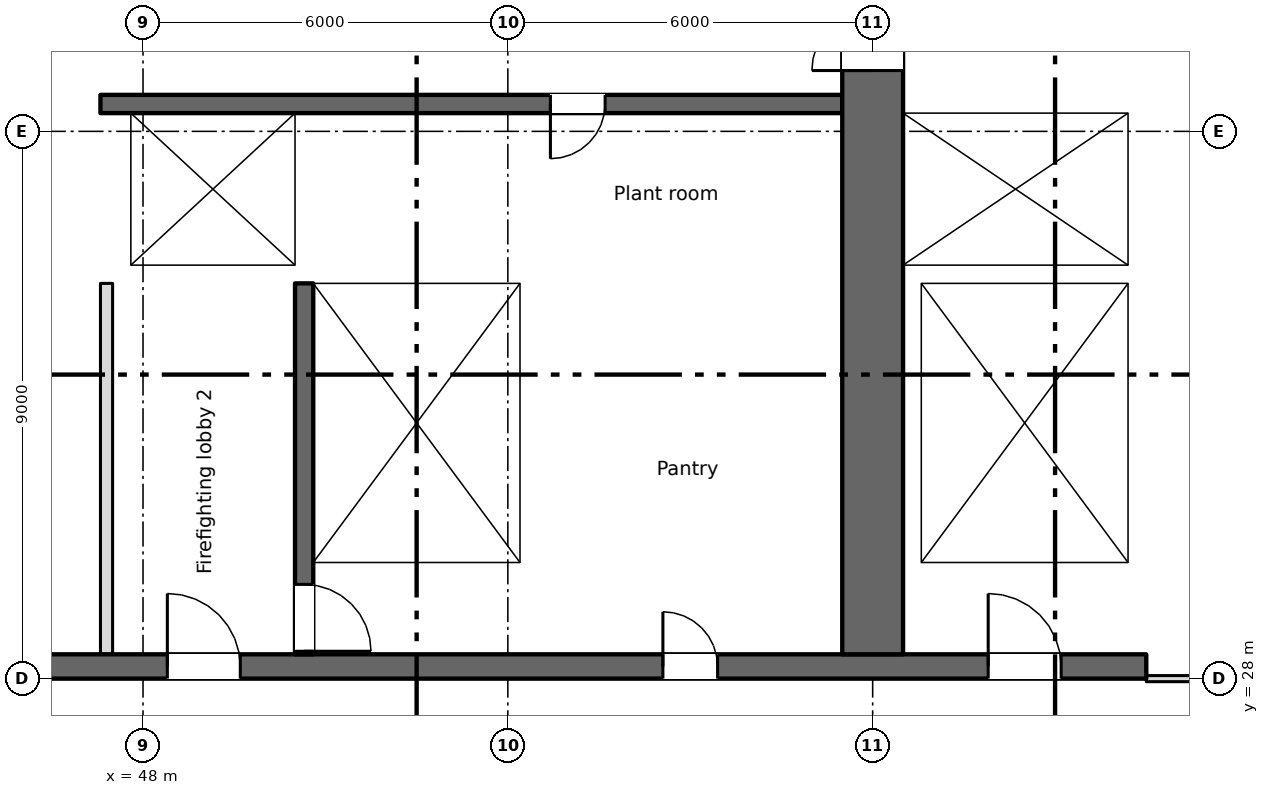
"""IFC4 building model, lengths in metres.
Left out: names, types, materials, properties, quantities, classifications, styles, units other than length and angle.
Written with IfcOpenShell. Run it as: python <this file> out.ifc"""

import sys

from ifc_helpers import new_model, si_unit, direction, frame, frame_2d, origin, place, context, subcontext, project, spatial, rectangle, extrude, element, fill, save


model = new_model("IFC4")
c1 = context("Model", 3, precision=1e-05, world=origin(), true_north=direction((0.0, 1.0)))
c2 = subcontext(c1, "Body", "Model", "MODEL_VIEW")
j1 = project(units=[si_unit("LENGTHUNIT", "METRE"), si_unit("PLANEANGLEUNIT", "RADIAN")], contexts=[c1])
p1 = place(None, origin())
s1 = spatial("IfcSite", under=j1, at=p1, CompositionType="ELEMENT")
p2 = place(p1, origin())
s2 = spatial("IfcBuilding", under=s1, at=p2, CompositionType="ELEMENT")
p3 = place(p2, frame((0.0, 0.0, 67.5)))
s3 = spatial("IfcBuildingStorey", under=s2, at=p3, CompositionType="ELEMENT", Elevation=67.5)
p4 = place(p3, frame((6.7, 28.2, 0.0), z_axis=(0.0, 0.0, 1.0), x_axis=(1.0, 0.0, 0.0)))
e1 = element("IfcWall", 1, at=p4, inside=s3, PredefinedType="SHEAR", context=c2, shape_type="SweptSolid", body=[
    extrude(rectangle(XDim=57.8, YDim=0.4, at=frame_2d((28.9, 0.0))), origin(), (0.0, 0.0, 1.0), 3.35),
])
p5 = place(p4, frame((12.562, 0.0, 0.0)))
e2 = element("IfcOpeningElement", 2, at=p5, cuts=e1, PredefinedType="OPENING", context=c2, shape_type="SweptSolid", body=[
    extrude(rectangle(XDim=0.9, YDim=2.1, at=frame_2d((0.45, 1.05))), frame((0.0, 0.21, 0.0), z_axis=(0.0, -1.0, 0.0), x_axis=(1.0, 0.0, 0.0)), (0.0, 0.0, 1.0), 0.42),
])
p6 = place(p4, frame((15.137, 0.0, 0.0)))
e3 = element("IfcOpeningElement", 3, at=p6, cuts=e1, PredefinedType="OPENING", context=c2, shape_type="SweptSolid", body=[
    extrude(rectangle(XDim=0.9, YDim=2.1, at=frame_2d((0.45, 1.05))), frame((0.0, 0.21, 0.0), z_axis=(0.0, -1.0, 0.0), x_axis=(1.0, 0.0, 0.0)), (0.0, 0.0, 1.0), 0.42),
])
p7 = place(p4, frame((49.85, 0.0, 0.0)))
e4 = element("IfcOpeningElement", 4, at=p7, cuts=e1, PredefinedType="OPENING", context=c2, shape_type="SweptSolid", body=[
    extrude(rectangle(XDim=0.9, YDim=2.1, at=frame_2d((0.45, 1.05))), frame((0.0, 0.21, 0.0), z_axis=(0.0, -1.0, 0.0), x_axis=(1.0, 0.0, 0.0)), (0.0, 0.0, 1.0), 0.42),
])
p8 = place(p4, frame((0.562, 0.0, 0.0)))
e5 = element("IfcOpeningElement", 5, at=p8, cuts=e1, PredefinedType="OPENING", context=c2, shape_type="SweptSolid", body=[
    extrude(rectangle(XDim=0.9, YDim=2.1, at=frame_2d((0.45, 1.05))), frame((0.0, 0.21, 0.0), z_axis=(0.0, -1.0, 0.0), x_axis=(1.0, 0.0, 0.0)), (0.0, 0.0, 1.0), 0.42),
])
p9 = place(p4, frame((2.137, 0.0, 0.0)))
e6 = element("IfcOpeningElement", 6, at=p9, cuts=e1, PredefinedType="OPENING", context=c2, shape_type="SweptSolid", body=[
    extrude(rectangle(XDim=0.9, YDim=2.1, at=frame_2d((0.45, 1.05))), frame((0.0, 0.21, 0.0), z_axis=(0.0, -1.0, 0.0), x_axis=(1.0, 0.0, 0.0)), (0.0, 0.0, 1.0), 0.42),
])
p10 = place(p4, frame((4.7, 0.0, 0.0)))
e7 = element("IfcOpeningElement", 7, at=p10, cuts=e1, PredefinedType="OPENING", context=c2, shape_type="SweptSolid", body=[
    extrude(rectangle(XDim=1.2, YDim=2.1, at=frame_2d((0.6, 1.05))), frame((0.0, 0.21, 0.0), z_axis=(0.0, -1.0, 0.0), x_axis=(1.0, 0.0, 0.0)), (0.0, 0.0, 1.0), 0.42),
])
p11 = place(p4, frame((31.7, 0.0, 0.0)))
e8 = element("IfcOpeningElement", 8, at=p11, cuts=e1, PredefinedType="OPENING", context=c2, shape_type="SweptSolid", body=[
    extrude(rectangle(XDim=1.2, YDim=2.1, at=frame_2d((0.6, 1.05))), frame((0.0, 0.21, 0.0), z_axis=(0.0, -1.0, 0.0), x_axis=(1.0, 0.0, 0.0)), (0.0, 0.0, 1.0), 0.42),
])
p12 = place(p4, frame((55.2, 0.0, 0.0)))
e9 = element("IfcOpeningElement", 9, at=p12, cuts=e1, PredefinedType="OPENING", context=c2, shape_type="SweptSolid", body=[
    extrude(rectangle(XDim=1.2, YDim=2.1, at=frame_2d((0.6, 1.05))), frame((0.0, 0.21, 0.0), z_axis=(0.0, -1.0, 0.0), x_axis=(1.0, 0.0, 0.0)), (0.0, 0.0, 1.0), 0.42),
])
p13 = place(p4, frame((21.7, 0.0, 0.0)))
e10 = element("IfcOpeningElement", 10, at=p13, cuts=e1, PredefinedType="OPENING", context=c2, shape_type="SweptSolid", body=[
    extrude(rectangle(XDim=1.2, YDim=2.1, at=frame_2d((0.6, 1.05))), frame((0.0, 0.21, 0.0), z_axis=(0.0, -1.0, 0.0), x_axis=(1.0, 0.0, 0.0)), (0.0, 0.0, 1.0), 0.42),
])
p14 = place(p4, frame((41.7, 0.0, 0.0)))
e11 = element("IfcOpeningElement", 11, at=p14, cuts=e1, PredefinedType="OPENING", context=c2, shape_type="SweptSolid", body=[
    extrude(rectangle(XDim=1.2, YDim=2.1, at=frame_2d((0.6, 1.05))), frame((0.0, 0.21, 0.0), z_axis=(0.0, -1.0, 0.0), x_axis=(1.0, 0.0, 0.0)), (0.0, 0.0, 1.0), 0.42),
])
p15 = place(p4, frame((24.85, 0.0, 0.0)))
e12 = element("IfcOpeningElement", 12, at=p15, cuts=e1, PredefinedType="OPENING", context=c2, shape_type="SweptSolid", body=[
    extrude(rectangle(XDim=2.4, YDim=2.1, at=frame_2d((1.2, 1.05))), frame((0.0, 0.21, 0.0), z_axis=(0.0, -1.0, 0.0), x_axis=(1.0, 0.0, 0.0)), (0.0, 0.0, 1.0), 0.42),
])
p16 = place(p4, frame((37.35, 0.0, 0.0)))
e13 = element("IfcOpeningElement", 13, at=p16, cuts=e1, PredefinedType="OPENING", context=c2, shape_type="SweptSolid", body=[
    extrude(rectangle(XDim=2.4, YDim=2.1, at=frame_2d((1.2, 1.05))), frame((0.0, 0.21, 0.0), z_axis=(0.0, -1.0, 0.0), x_axis=(1.0, 0.0, 0.0)), (0.0, 0.0, 1.0), 0.42),
])
p17 = place(p4, frame((7.85, 0.0, 0.0)))
e14 = element("IfcOpeningElement", 14, at=p17, cuts=e1, PredefinedType="OPENING", context=c2, shape_type="SweptSolid", body=[
    extrude(rectangle(XDim=2.4, YDim=2.1, at=frame_2d((1.2, 1.05))), frame((0.0, 0.21, 0.0), z_axis=(0.0, -1.0, 0.0), x_axis=(1.0, 0.0, 0.0)), (0.0, 0.0, 1.0), 0.42),
])
p18 = place(p4, frame((28.85, 0.0, 0.0)))
e15 = element("IfcOpeningElement", 15, at=p18, cuts=e1, PredefinedType="OPENING", context=c2, shape_type="SweptSolid", body=[
    extrude(rectangle(XDim=0.9, YDim=2.1, at=frame_2d((0.45, 1.05))), frame((0.0, 0.21, 0.0), z_axis=(0.0, -1.0, 0.0), x_axis=(1.0, 0.0, 0.0)), (0.0, 0.0, 1.0), 0.42),
])
p19 = place(p4, frame((34.85, 0.0, 0.0)))
e16 = element("IfcOpeningElement", 16, at=p19, cuts=e1, PredefinedType="OPENING", context=c2, shape_type="SweptSolid", body=[
    extrude(rectangle(XDim=0.9, YDim=2.1, at=frame_2d((0.45, 1.05))), frame((0.0, 0.21, 0.0), z_axis=(0.0, -1.0, 0.0), x_axis=(1.0, 0.0, 0.0)), (0.0, 0.0, 1.0), 0.42),
])
p20 = place(p3, frame((64.35, 34.8, 0.0), z_axis=(0.0, 0.0, 1.0), x_axis=(0.0, 1.0, 0.0)))
e17 = element("IfcWall", 17, at=p20, inside=s3, PredefinedType="SHEAR", context=c2, shape_type="SweptSolid", body=[
    extrude(rectangle(XDim=10.2, YDim=0.3, at=frame_2d((5.1, 0.0))), origin(), (0.0, 0.0, 1.0), 3.35),
])
p21 = place(p3, frame((60.0, 28.4, 0.0), z_axis=(0.0, 0.0, 1.0), x_axis=(0.0, 1.0, 0.0)))
e18 = element("IfcWall", 18, at=p21, inside=s3, PredefinedType="SHEAR", context=c2, shape_type="SweptSolid", body=[
    extrude(rectangle(XDim=16.6, YDim=1.0, at=frame_2d((8.3, 0.0))), origin(), (0.0, 0.0, 1.0), 3.35),
])
p22 = place(p21, frame((9.6, 0.0, 0.0)))
e19 = element("IfcOpeningElement", 19, at=p22, cuts=e18, PredefinedType="OPENING", context=c2, shape_type="SweptSolid", body=[
    extrude(rectangle(XDim=2.0, YDim=2.1, at=frame_2d((1.0, 1.05))), frame((0.0, 0.51, 0.0), z_axis=(0.0, -1.0, 0.0), x_axis=(1.0, 0.0, 0.0)), (0.0, 0.0, 1.0), 1.02),
])
p23 = place(p21, frame((15.25, 0.0, 0.0)))
e20 = element("IfcOpeningElement", 20, at=p23, cuts=e18, PredefinedType="OPENING", context=c2, shape_type="SweptSolid", body=[
    extrude(rectangle(XDim=1.2, YDim=2.1, at=frame_2d((0.6, 1.05))), frame((0.0, 0.51, 0.0), z_axis=(0.0, -1.0, 0.0), x_axis=(1.0, 0.0, 0.0)), (0.0, 0.0, 1.0), 1.02),
])
p24 = place(p3, frame((50.65, 34.5, 0.0), z_axis=(0.0, 0.0, 1.0), x_axis=(0.0, -1.0, 0.0)))
e21 = element("IfcWall", 21, at=p24, inside=s3, PredefinedType="SHEAR", context=c2, shape_type="SweptSolid", body=[
    extrude(rectangle(XDim=6.1, YDim=0.3, at=frame_2d((3.05, 0.0))), origin(), (0.0, 0.0, 1.0), 3.35),
])
p25 = place(p24, frame((4.95, 0.0, 0.0)))
e22 = element("IfcOpeningElement", 22, at=p25, cuts=e21, PredefinedType="OPENING", context=c2, shape_type="SweptSolid", body=[
    extrude(rectangle(XDim=1.1, YDim=2.1, at=frame_2d((0.55, 1.05))), frame((0.0, 0.16, 0.0), z_axis=(0.0, -1.0, 0.0), x_axis=(1.0, 0.0, 0.0)), (0.0, 0.0, 1.0), 0.32),
])
for number, where, z_axis, x_axis in (
    (23, (54.35, 28.4, 0.0), (0.0, 0.0, 1.0), (0.0, 1.0, 0.0)),
    (24, (60.65, 28.4, 0.0), (0.0, 0.0, 1.0), (0.0, 1.0, 0.0)),
    (25, (64.35, 28.4, 0.0), (0.0, 0.0, 1.0), (0.0, 1.0, 0.0)),
):
    element("IfcWall", number, at=place(p3, frame(where, z_axis=z_axis, x_axis=x_axis)), inside=s3, PredefinedType="SHEAR", context=c2, shape_type="SweptSolid", body=[
        extrude(rectangle(XDim=6.1, YDim=0.3, at=frame_2d((3.05, 0.0))), origin(), (0.0, 0.0, 1.0), 3.35),
    ])
p26 = place(p3, frame((47.3, 34.65, 0.0), z_axis=(0.0, 0.0, 1.0), x_axis=(1.0, 0.0, 0.0)))
e26 = element("IfcWall", 26, at=p26, inside=s3, PredefinedType="SHEAR", context=c2, shape_type="SweptSolid", body=[
    extrude(rectangle(XDim=12.2, YDim=0.3, at=frame_2d((6.1, 0.0))), origin(), (0.0, 0.0, 1.0), 3.35),
])
p27 = place(p26, frame((1.3, 0.0, 0.0)))
e27 = element("IfcOpeningElement", 27, at=p27, cuts=e26, PredefinedType="OPENING", context=c2, shape_type="SweptSolid", body=[
    extrude(rectangle(XDim=1.1, YDim=2.1, at=frame_2d((0.55, 1.05))), frame((0.0, 0.16, 0.0), z_axis=(0.0, -1.0, 0.0), x_axis=(1.0, 0.0, 0.0)), (0.0, 0.0, 1.0), 0.32),
])
p28 = place(p3, frame((60.5, 34.65, 0.0), z_axis=(0.0, 0.0, 1.0), x_axis=(1.0, 0.0, 0.0)))
e28 = element("IfcWall", 28, at=p28, inside=s3, PredefinedType="SHEAR", context=c2, shape_type="SweptSolid", body=[
    extrude(rectangle(XDim=4.0, YDim=0.3, at=frame_2d((2.0, 0.0))), origin(), (0.0, 0.0, 1.0), 3.35),
])
p29 = place(p3, frame((59.5, 37.45, 0.0), z_axis=(0.0, 0.0, 1.0), x_axis=(-1.0, 0.0, 0.0)))
e29 = element("IfcWall", 29, at=p29, inside=s3, PredefinedType="SHEAR", context=c2, shape_type="SweptSolid", body=[
    extrude(rectangle(XDim=12.2, YDim=0.3, at=frame_2d((6.1, 0.0))), origin(), (0.0, 0.0, 1.0), 3.35),
])
p30 = place(p29, frame((3.9, 0.0, 0.0)))
e30 = element("IfcOpeningElement", 30, at=p30, cuts=e29, PredefinedType="OPENING", context=c2, shape_type="SweptSolid", body=[
    extrude(rectangle(XDim=0.9, YDim=2.1, at=frame_2d((0.45, 1.05))), frame((0.0, 0.16, 0.0), z_axis=(0.0, -1.0, 0.0), x_axis=(1.0, 0.0, 0.0)), (0.0, 0.0, 1.0), 0.32),
])
p31 = place(p3, frame((60.5, 37.45, 0.0), z_axis=(0.0, 0.0, 1.0), x_axis=(1.0, 0.0, 0.0)))
e31 = element("IfcWall", 31, at=p31, inside=s3, PredefinedType="SHEAR", context=c2, shape_type="SweptSolid", body=[
    extrude(rectangle(XDim=3.7, YDim=0.3, at=frame_2d((1.85, 0.0))), origin(), (0.0, 0.0, 1.0), 3.35),
])
p32 = place(p31, frame((1.3, 0.0, 0.0)))
e32 = element("IfcOpeningElement", 32, at=p32, cuts=e31, PredefinedType="OPENING", context=c2, shape_type="SweptSolid", body=[
    extrude(rectangle(XDim=1.1, YDim=2.1, at=frame_2d((0.55, 1.05))), frame((0.0, 0.16, 0.0), z_axis=(0.0, -1.0, 0.0), x_axis=(1.0, 0.0, 0.0)), (0.0, 0.0, 1.0), 0.32),
])
p33 = place(p3, frame((47.55, 34.8, 0.0), z_axis=(0.0, 0.0, 1.0), x_axis=(0.0, 1.0, 0.0)))
e33 = element("IfcWall", 33, at=p33, inside=s3, PredefinedType="SHEAR", context=c2, shape_type="SweptSolid", body=[
    extrude(rectangle(XDim=2.5, YDim=0.5, at=frame_2d((1.25, 0.0))), origin(), (0.0, 0.0, 1.0), 3.35),
])
p34 = place(p3, frame((50.65, 34.8, 0.0), z_axis=(0.0, 0.0, 1.0), x_axis=(0.0, 1.0, 0.0)))
e34 = element("IfcWall", 34, at=p34, inside=s3, PredefinedType="SHEAR", context=c2, shape_type="SweptSolid", body=[
    extrude(rectangle(XDim=2.5, YDim=0.3, at=frame_2d((1.25, 0.0))), origin(), (0.0, 0.0, 1.0), 3.35),
])
p35 = place(p3, frame((47.4, 28.4, 0.0), z_axis=(0.0, 0.0, 1.0), x_axis=(0.0, 1.0, 0.0)))
e35 = element("IfcWall", 35, at=p35, inside=s3, PredefinedType="PARTITIONING", context=c2, shape_type="SweptSolid", body=[
    extrude(rectangle(XDim=6.1, YDim=0.2, at=frame_2d((3.05, 0.0))), origin(), (0.0, 0.0, 1.0), 3.35),
])
p36 = place(p3, frame((64.5, 28.0, 0.0), z_axis=(0.0, 0.0, 1.0), x_axis=(1.0, 0.0, 0.0)))
e36 = element("IfcWall", 36, at=p36, inside=s3, PredefinedType="PARTITIONING", context=c2, shape_type="SweptSolid", body=[
    extrude(rectangle(XDim=12.7, YDim=0.1, at=frame_2d((6.35, 0.0))), origin(), (0.0, 0.0, 1.0), 3.35),
])
p37 = place(p36, frame((2.575, 0.0, 0.0)))
e37 = element("IfcOpeningElement", 37, at=p37, cuts=e36, PredefinedType="OPENING", context=c2, shape_type="SweptSolid", body=[
    extrude(rectangle(XDim=1.2, YDim=2.1, at=frame_2d((0.6, 1.05))), frame((0.0, 0.06, 0.0), z_axis=(0.0, -1.0, 0.0), x_axis=(1.0, 0.0, 0.0)), (0.0, 0.0, 1.0), 0.12),
])
p38 = place(p36, frame((8.925, 0.0, 0.0)))
e38 = element("IfcOpeningElement", 38, at=p38, cuts=e36, PredefinedType="OPENING", context=c2, shape_type="SweptSolid", body=[
    extrude(rectangle(XDim=1.2, YDim=2.1, at=frame_2d((0.6, 1.05))), frame((0.0, 0.06, 0.0), z_axis=(0.0, -1.0, 0.0), x_axis=(1.0, 0.0, 0.0)), (0.0, 0.0, 1.0), 0.12),
])
p39 = place(p7, origin())
e39 = element("IfcDoor", 39, at=p39, inside=s3, OperationType="SINGLE_SWING_LEFT", PredefinedType="DOOR", context=c2, shape_type="SweptSolid", body=[
    extrude(rectangle(XDim=0.9, YDim=2.1, at=frame_2d((0.45, 1.05))), frame((0.0, 0.025, 0.0), z_axis=(0.0, -1.0, 0.0), x_axis=(1.0, 0.0, 0.0)), (0.0, 0.0, 1.0), 0.05),
])
fill(e4, e39)
p40 = place(p30, origin())
e40 = element("IfcDoor", 40, at=p40, inside=s3, OperationType="SINGLE_SWING_RIGHT", PredefinedType="DOOR", context=c2, shape_type="SweptSolid", body=[
    extrude(rectangle(XDim=0.9, YDim=2.1, at=frame_2d((0.45, 1.05))), frame((0.0, 0.025, 0.0), z_axis=(0.0, -1.0, 0.0), x_axis=(1.0, 0.0, 0.0)), (0.0, 0.0, 1.0), 0.05),
])
fill(e30, e40)
p41 = place(p32, origin())
e41 = element("IfcDoor", 41, at=p41, inside=s3, OperationType="SLIDING_TO_LEFT", PredefinedType="DOOR", context=c2, shape_type="SweptSolid", body=[
    extrude(rectangle(XDim=1.1, YDim=2.1, at=frame_2d((0.55, 1.05))), frame((0.0, 0.025, 0.0), z_axis=(0.0, -1.0, 0.0), x_axis=(1.0, 0.0, 0.0)), (0.0, 0.0, 1.0), 0.05),
])
fill(e32, e41)
p42 = place(p27, origin())
e42 = element("IfcDoor", 42, at=p42, inside=s3, OperationType="SLIDING_TO_LEFT", PredefinedType="DOOR", context=c2, shape_type="SweptSolid", body=[
    extrude(rectangle(XDim=1.1, YDim=2.1, at=frame_2d((0.55, 1.05))), frame((0.0, 0.025, 0.0), z_axis=(0.0, -1.0, 0.0), x_axis=(1.0, 0.0, 0.0)), (0.0, 0.0, 1.0), 0.05),
])
fill(e27, e42)
p43 = place(p25, origin())
e43 = element("IfcDoor", 43, at=p43, inside=s3, OperationType="SINGLE_SWING_RIGHT", PredefinedType="DOOR", context=c2, shape_type="SweptSolid", body=[
    extrude(rectangle(XDim=1.1, YDim=2.1, at=frame_2d((0.55, 1.05))), frame((0.0, 0.025, 0.0), z_axis=(0.0, -1.0, 0.0), x_axis=(1.0, 0.0, 0.0)), (0.0, 0.0, 1.0), 0.05),
])
fill(e22, e43)
p44 = place(p12, origin())
e44 = element("IfcDoor", 44, at=p44, inside=s3, OperationType="SINGLE_SWING_LEFT", PredefinedType="DOOR", context=c2, shape_type="SweptSolid", body=[
    extrude(rectangle(XDim=1.2, YDim=2.1, at=frame_2d((0.6, 1.05))), frame((0.0, 0.025, 0.0), z_axis=(0.0, -1.0, 0.0), x_axis=(1.0, 0.0, 0.0)), (0.0, 0.0, 1.0), 0.05),
])
fill(e9, e44)
p45 = place(p14, origin())
e45 = element("IfcDoor", 45, at=p45, inside=s3, OperationType="SINGLE_SWING_LEFT", PredefinedType="DOOR", context=c2, shape_type="SweptSolid", body=[
    extrude(rectangle(XDim=1.2, YDim=2.1, at=frame_2d((0.6, 1.05))), frame((0.0, 0.025, 0.0), z_axis=(0.0, -1.0, 0.0), x_axis=(1.0, 0.0, 0.0)), (0.0, 0.0, 1.0), 0.05),
])
fill(e11, e45)
p46 = place(p22, origin())
e46 = element("IfcDoor", 46, at=p46, inside=s3, OperationType="DOUBLE_DOOR_SINGLE_SWING", PredefinedType="DOOR", context=c2, shape_type="SweptSolid", body=[
    extrude(rectangle(XDim=2.0, YDim=2.1, at=frame_2d((1.0, 1.05))), frame((0.0, 0.025, 0.0), z_axis=(0.0, -1.0, 0.0), x_axis=(1.0, 0.0, 0.0)), (0.0, 0.0, 1.0), 0.05),
])
fill(e19, e46)
save(model, sys.argv[1])
